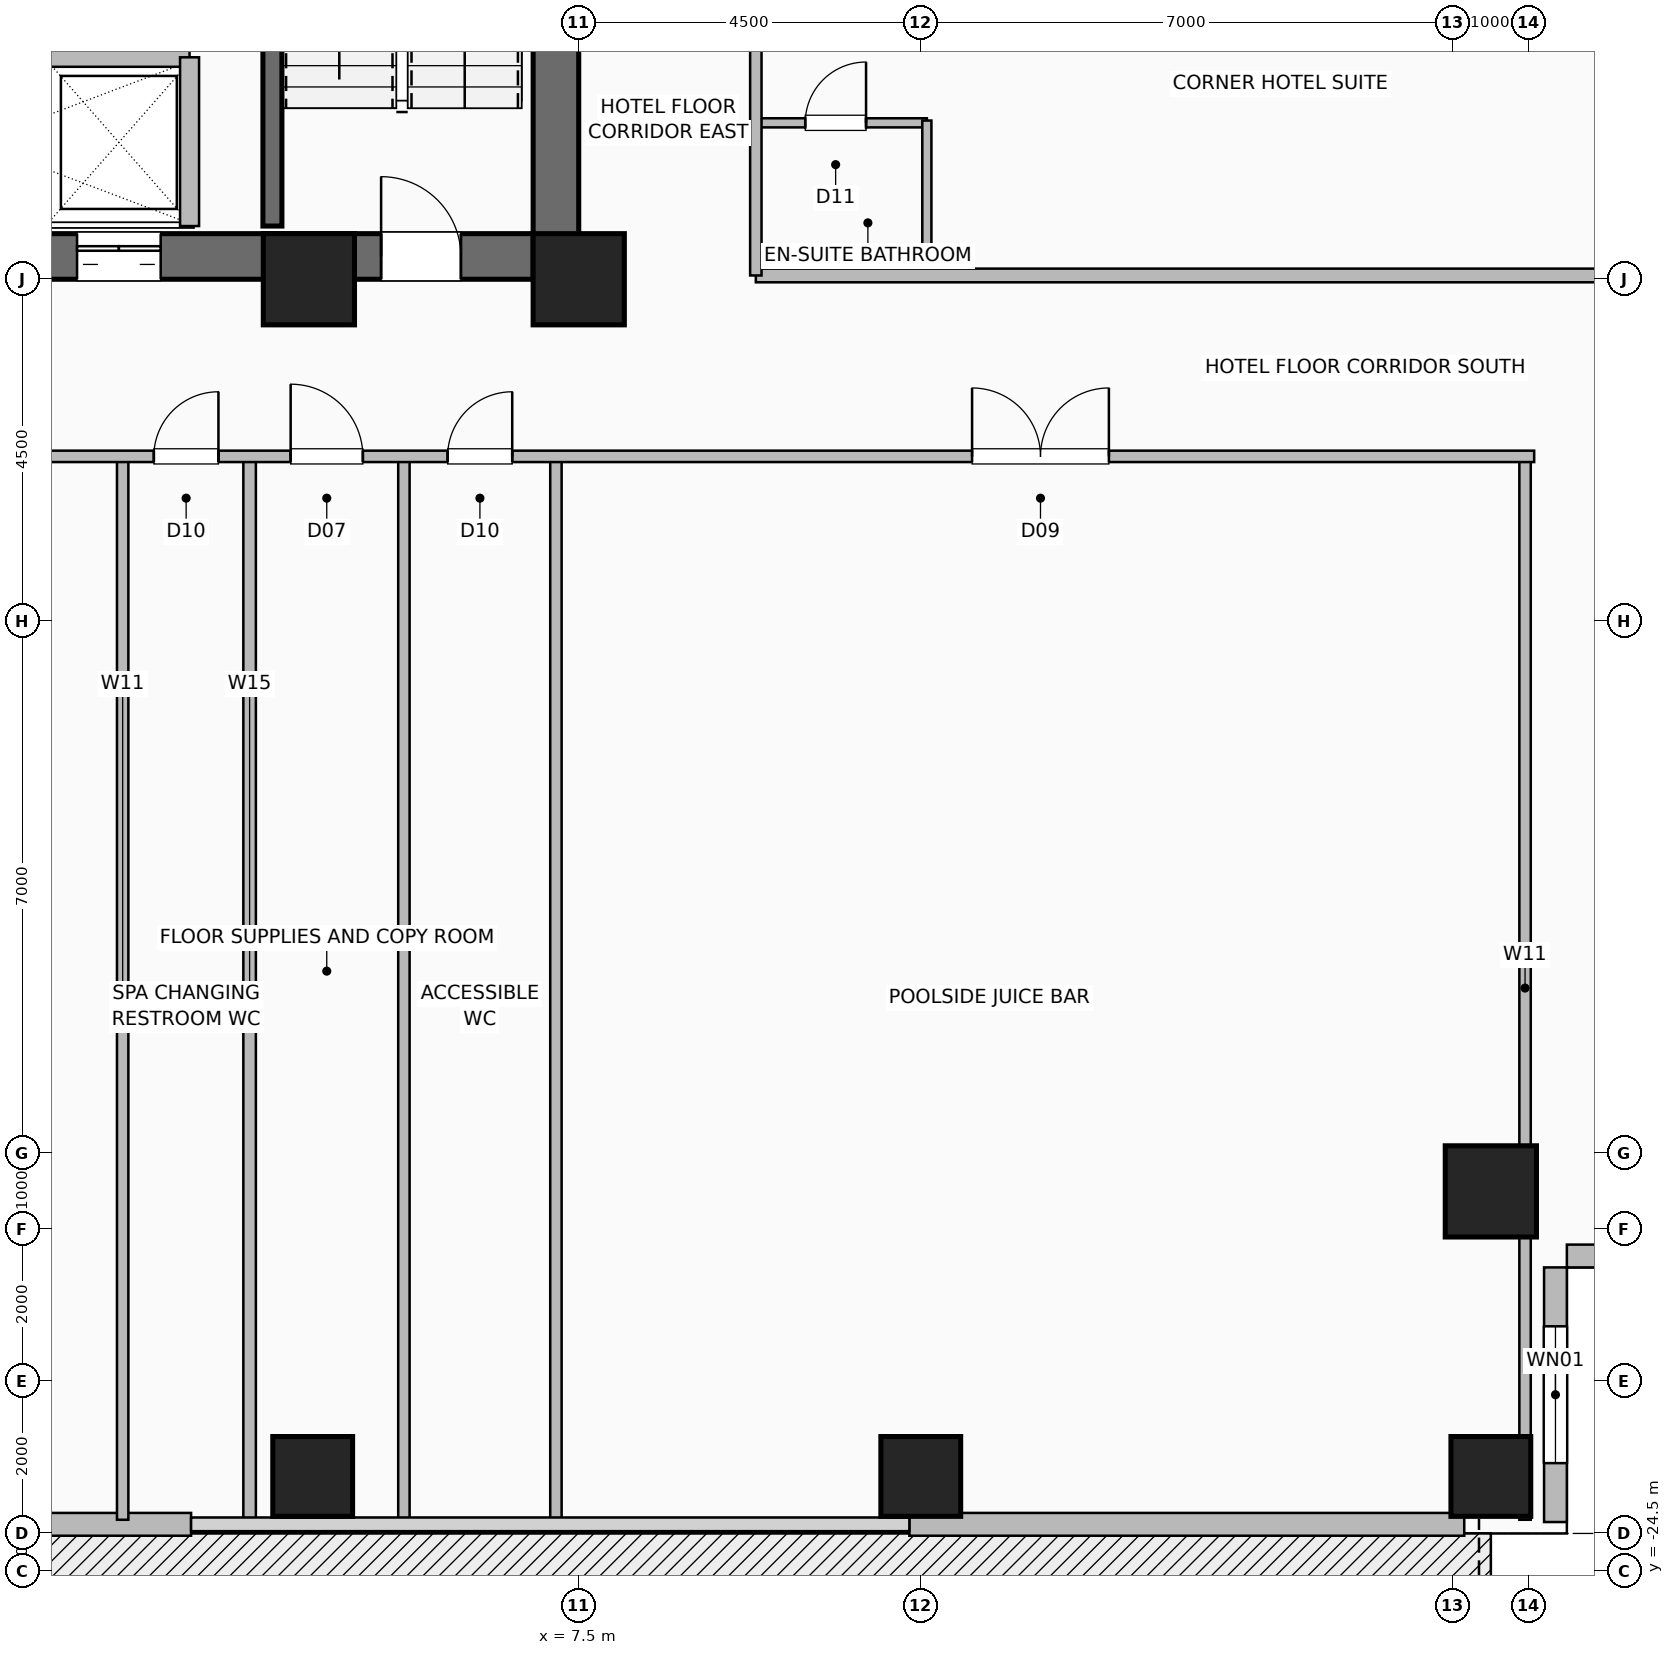
"""IFC4 building model, lengths in metres.
Left out: names, types, materials, properties, quantities, classifications, styles, units other than length and angle.
Written with IfcOpenShell. Run it as: python <this file> out.ifc"""

import sys

from ifc_helpers import new_model, si_unit, direction, frame, frame_2d, origin, origin_2d, place, context, subcontext, project, spatial, rectangle, hollow_rectangle, extrude, element, fill, save


model = new_model("IFC4")
c1 = context("Model", 3, precision=1e-05, world=origin(), true_north=direction((0.0, 1.0)))
c2 = subcontext(c1, "Body", "Model", "MODEL_VIEW")
j1 = project(units=[si_unit("LENGTHUNIT", "METRE"), si_unit("PLANEANGLEUNIT", "RADIAN")], contexts=[c1])
p1 = place(None, origin())
s1 = spatial("IfcSite", under=j1, at=p1, CompositionType="ELEMENT")
p2 = place(p1, origin())
s2 = spatial("IfcBuilding", under=s1, at=p2, CompositionType="ELEMENT")
p3 = place(p2, frame((0.0, 0.0, 55.0)))
s3 = spatial("IfcBuildingStorey", under=s2, at=p3, CompositionType="ELEMENT", Elevation=55.0)
for number, where, z_axis, x_axis in (
    (1, (3.95, -7.5, 0.0), (0.0, 0.0, 1.0), (1.0, 0.0, 0.0)),
    (2, (7.5, -7.5, 0.0), (0.0, 0.0, 1.0), (1.0, 0.0, 0.0)),
):
    element("IfcColumn", number, at=place(p3, frame(where, z_axis=z_axis, x_axis=x_axis)), inside=s3, PredefinedType="COLUMN", context=c2, shape_type="SweptSolid", body=[
        extrude(hollow_rectangle(XDim=1.2, YDim=1.2, WallThickness=0.055, at=origin_2d()), origin(), (0.0, 0.0, 1.0), 3.5),
    ])
for number, where, z_axis, x_axis in (
    (3, (4.0, -23.25, 0.0), (0.0, 0.0, 1.0), (1.0, 0.0, 0.0)),
    (4, (12.0, -23.25, 0.0), (0.0, 0.0, 1.0), (1.0, 0.0, 0.0)),
    (5, (19.5, -23.25, 0.0), (0.0, 0.0, 1.0), (1.0, 0.0, 0.0)),
):
    element("IfcColumn", number, at=place(p3, frame(where, z_axis=z_axis, x_axis=x_axis)), inside=s3, PredefinedType="COLUMN", context=c2, shape_type="SweptSolid", body=[
        extrude(hollow_rectangle(XDim=1.05, YDim=1.05, WallThickness=0.05, at=origin_2d()), origin(), (0.0, 0.0, 1.0), 3.5),
    ])
p4 = place(p3, frame((19.5, -19.5, 0.0), z_axis=(0.0, 0.0, 1.0), x_axis=(1.0, 0.0, 0.0)))
e6 = element("IfcColumn", 6, at=p4, inside=s3, PredefinedType="COLUMN", context=c2, shape_type="SweptSolid", body=[
    extrude(hollow_rectangle(XDim=1.2, YDim=1.2, WallThickness=0.055, at=origin_2d()), origin(), (0.0, 0.0, 1.0), 3.5),
])
p5 = place(p3, frame((11.85, -23.88, 0.0), z_axis=(0.0, 0.0, 1.0), x_axis=(1.0, 0.0, 0.0)))
e7 = element("IfcWall", 7, at=p5, inside=s3, PredefinedType="SOLIDWALL", context=c2, shape_type="SweptSolid", body=[
    extrude(rectangle(XDim=7.3, YDim=0.3, at=frame_2d((3.65, 0.0))), origin(), (0.0, 0.0, 1.0), 3.25),
])
p6 = place(p3, frame((-2.4, -23.88, 0.0), z_axis=(0.0, 0.0, 1.0), x_axis=(1.0, 0.0, 0.0)))
e8 = element("IfcWall", 8, at=p6, inside=s3, PredefinedType="SOLIDWALL", context=c2, shape_type="SweptSolid", body=[
    extrude(rectangle(XDim=4.8, YDim=0.3, at=frame_2d((2.4, 0.0))), origin(), (0.0, 0.0, 1.0), 3.25),
])
p7 = place(p6, frame((1.85, 0.0, 0.0)))
e9 = element("IfcOpeningElement", 9, at=p7, cuts=e8, PredefinedType="OPENING", context=c2, shape_type="SweptSolid", body=[
    extrude(rectangle(XDim=1.1, YDim=2.2, at=frame_2d((0.55, 1.1))), frame((0.0, 0.16, 0.0), z_axis=(0.0, -1.0, 0.0), x_axis=(1.0, 0.0, 0.0)), (0.0, 0.0, 1.0), 0.32),
])
p8 = place(p6, frame((0.15, 0.0, 0.85)))
e10 = element("IfcOpeningElement", 10, at=p8, cuts=e8, PredefinedType="OPENING", context=c2, shape_type="SweptSolid", body=[
    extrude(rectangle(XDim=1.5, YDim=1.8, at=frame_2d((0.75, 0.9))), frame((0.0, 0.16, 0.0), z_axis=(0.0, -1.0, 0.0), x_axis=(1.0, 0.0, 0.0)), (0.0, 0.0, 1.0), 0.32),
])
p9 = place(p3, frame((20.35, -23.85, 0.0), z_axis=(0.0, 0.0, 1.0), x_axis=(0.0, 1.0, 0.0)))
e11 = element("IfcWall", 11, at=p9, inside=s3, PredefinedType="SOLIDWALL", context=c2, shape_type="SweptSolid", body=[
    extrude(rectangle(XDim=3.35, YDim=0.3, at=frame_2d((1.675, 0.0))), origin(), (0.0, 0.0, 1.0), 3.25),
])
p10 = place(p9, frame((0.775, 0.0, 0.9)))
e12 = element("IfcOpeningElement", 12, at=p10, cuts=e11, PredefinedType="OPENING", context=c2, shape_type="SweptSolid", body=[
    extrude(rectangle(XDim=1.8, YDim=1.8, at=frame_2d((0.9, 0.9))), frame((0.0, 0.16, 0.0), z_axis=(0.0, -1.0, 0.0), x_axis=(1.0, 0.0, 0.0)), (0.0, 0.0, 1.0), 0.32),
])
p11 = place(p3, frame((23.85, -20.35, 0.0), z_axis=(0.0, 0.0, 1.0), x_axis=(-1.0, 0.0, 0.0)))
e13 = element("IfcWall", 13, at=p11, inside=s3, PredefinedType="SOLIDWALL", context=c2, shape_type="SweptSolid", body=[
    extrude(rectangle(XDim=3.35, YDim=0.3, at=frame_2d((1.675, 0.0))), origin(), (0.0, 0.0, 1.0), 3.25),
])
p12 = place(p3, frame((-7.5, -7.2, 0.0), z_axis=(0.0, 0.0, 1.0), x_axis=(1.0, 0.0, 0.0)))
e14 = element("IfcWall", 14, at=p12, inside=s3, PredefinedType="SHEAR", context=c2, shape_type="SweptSolid", body=[
    extrude(rectangle(XDim=15.0, YDim=0.6, at=frame_2d((7.5, 0.0))), origin(), (0.0, 0.0, 1.0), 3.25),
])
p13 = place(p12, frame((1.55, 0.0, 0.0)))
e15 = element("IfcOpeningElement", 15, at=p13, cuts=e14, PredefinedType="OPENING", context=c2, shape_type="SweptSolid", body=[
    extrude(rectangle(XDim=1.05, YDim=2.08, at=frame_2d((0.525, 1.04))), frame((0.0, 0.31, 0.0), z_axis=(0.0, -1.0, 0.0), x_axis=(1.0, 0.0, 0.0)), (0.0, 0.0, 1.0), 0.62),
])
p14 = place(p12, frame((12.4, 0.0, 0.0)))
e16 = element("IfcOpeningElement", 16, at=p14, cuts=e14, PredefinedType="OPENING", context=c2, shape_type="SweptSolid", body=[
    extrude(rectangle(XDim=1.05, YDim=2.08, at=frame_2d((0.525, 1.04))), frame((0.0, 0.31, 0.0), z_axis=(0.0, -1.0, 0.0), x_axis=(1.0, 0.0, 0.0)), (0.0, 0.0, 1.0), 0.62),
])
p15 = place(p12, frame((4.64, 0.0, 0.0)))
e17 = element("IfcOpeningElement", 17, at=p15, cuts=e14, PredefinedType="OPENING", context=c2, shape_type="SweptSolid", body=[
    extrude(rectangle(XDim=1.1, YDim=2.2, at=frame_2d((0.55, 1.1))), frame((0.0, 0.31, 0.0), z_axis=(0.0, -1.0, 0.0), x_axis=(1.0, 0.0, 0.0)), (0.0, 0.0, 1.0), 0.62),
])
p16 = place(p12, frame((6.52, 0.0, 0.0)))
e18 = element("IfcOpeningElement", 18, at=p16, cuts=e14, PredefinedType="OPENING", context=c2, shape_type="SweptSolid", body=[
    extrude(rectangle(XDim=1.1, YDim=2.2, at=frame_2d((0.55, 1.1))), frame((0.0, 0.31, 0.0), z_axis=(0.0, -1.0, 0.0), x_axis=(1.0, 0.0, 0.0)), (0.0, 0.0, 1.0), 0.62),
])
p17 = place(p12, frame((8.4, 0.0, 0.0)))
e19 = element("IfcOpeningElement", 19, at=p17, cuts=e14, PredefinedType="OPENING", context=c2, shape_type="SweptSolid", body=[
    extrude(rectangle(XDim=1.1, YDim=2.2, at=frame_2d((0.55, 1.1))), frame((0.0, 0.31, 0.0), z_axis=(0.0, -1.0, 0.0), x_axis=(1.0, 0.0, 0.0)), (0.0, 0.0, 1.0), 0.62),
])
p18 = place(p3, frame((7.2, -7.5, 0.0), z_axis=(0.0, 0.0, 1.0), x_axis=(0.0, 1.0, 0.0)))
e20 = element("IfcWall", 20, at=p18, inside=s3, PredefinedType="SHEAR", context=c2, shape_type="SweptSolid", body=[
    extrude(rectangle(XDim=15.0, YDim=0.6, at=frame_2d((7.5, 0.0))), origin(), (0.0, 0.0, 1.0), 3.25),
])
p19 = place(p3, frame((3.47, -6.8, 0.0), z_axis=(0.0, 0.0, 1.0), x_axis=(0.0, 1.0, 0.0)))
e21 = element("IfcWall", 21, at=p19, inside=s3, PredefinedType="SHEAR", context=c2, shape_type="SweptSolid", body=[
    extrude(rectangle(XDim=7.72, YDim=0.25, at=frame_2d((3.86, 0.0))), origin(), (0.0, 0.0, 1.0), 3.25),
])
p20 = place(p3, frame((-3.26, -4.58, 0.0), z_axis=(0.0, 0.0, 1.0), x_axis=(1.0, 0.0, 0.0)))
e22 = element("IfcWall", 22, at=p20, inside=s3, PredefinedType="SHEAR", context=c2, shape_type="SweptSolid", body=[
    extrude(rectangle(XDim=5.64, YDim=0.25, at=frame_2d((2.82, 0.0))), origin(), (0.0, 0.0, 1.0), 3.25),
])
p21 = place(p3, frame((2.38, -6.8, 0.0), z_axis=(0.0, 0.0, 1.0), x_axis=(0.0, 1.0, 0.0)))
e23 = element("IfcWall", 23, at=p21, inside=s3, PredefinedType="SHEAR", context=c2, shape_type="SweptSolid", body=[
    extrude(rectangle(XDim=2.22, YDim=0.25, at=frame_2d((1.11, 0.0))), origin(), (0.0, 0.0, 1.0), 3.25),
])
p22 = place(p3, frame((3.17, -23.82, 0.0), z_axis=(0.0, 0.0, 1.0), x_axis=(0.0, 1.0, 0.0)))
e24 = element("IfcWall", 24, at=p22, inside=s3, PredefinedType="PLUMBINGWALL", context=c2, shape_type="SweptSolid", body=[
    extrude(rectangle(XDim=13.99, YDim=0.165, at=frame_2d((6.995, 0.0))), origin(), (0.0, 0.0, 1.0), 3.25),
])
for number, where, z_axis, x_axis in (
    (25, (1.5, -23.82, 0.0), (0.0, 0.0, 1.0), (0.0, 1.0, 0.0)),
    (26, (5.2, -23.82, 0.0), (0.0, 0.0, 1.0), (0.0, 1.0, 0.0)),
    (27, (7.2, -23.82, 0.0), (0.0, 0.0, 1.0), (0.0, 1.0, 0.0)),
    (28, (19.95, -23.82, 0.0), (0.0, 0.0, 1.0), (0.0, 1.0, 0.0)),
):
    element("IfcWall", number, at=place(p3, frame(where, z_axis=z_axis, x_axis=x_axis)), inside=s3, PredefinedType="PARTITIONING", context=c2, shape_type="SweptSolid", body=[
        extrude(rectangle(XDim=13.99, YDim=0.15, at=frame_2d((6.995, 0.0))), origin(), (0.0, 0.0, 1.0), 3.25),
    ])
p23 = place(p3, frame((-20.07, -9.83, 0.0), z_axis=(0.0, 0.0, 1.0), x_axis=(1.0, 0.0, 0.0)))
e29 = element("IfcWall", 29, at=p23, inside=s3, PredefinedType="PARTITIONING", context=c2, shape_type="SweptSolid", body=[
    extrude(rectangle(XDim=40.14, YDim=0.15, at=frame_2d((20.07, 0.0))), origin(), (0.0, 0.0, 1.0), 3.25),
])
p24 = place(p23, frame((4.445, 0.0, 0.0)))
e30 = element("IfcOpeningElement", 30, at=p24, cuts=e29, PredefinedType="OPENING", context=c2, shape_type="SweptSolid", body=[
    extrude(rectangle(XDim=1.8, YDim=2.08, at=frame_2d((0.9, 1.04))), frame((0.0, 0.085, 0.0), z_axis=(0.0, -1.0, 0.0), x_axis=(1.0, 0.0, 0.0)), (0.0, 0.0, 1.0), 0.17),
])
p25 = place(p23, frame((15.17, 0.0, 0.0)))
e31 = element("IfcOpeningElement", 31, at=p25, cuts=e29, PredefinedType="OPENING", context=c2, shape_type="SweptSolid", body=[
    extrude(rectangle(XDim=1.8, YDim=2.08, at=frame_2d((0.9, 1.04))), frame((0.0, 0.085, 0.0), z_axis=(0.0, -1.0, 0.0), x_axis=(1.0, 0.0, 0.0)), (0.0, 0.0, 1.0), 0.17),
])
p26 = place(p23, frame((21.98, 0.0, 0.0)))
e32 = element("IfcOpeningElement", 32, at=p26, cuts=e29, PredefinedType="OPENING", context=c2, shape_type="SweptSolid", body=[
    extrude(rectangle(XDim=0.85, YDim=2.05, at=frame_2d((0.425, 1.025))), frame((0.0, 0.085, 0.0), z_axis=(0.0, -1.0, 0.0), x_axis=(1.0, 0.0, 0.0)), (0.0, 0.0, 1.0), 0.17),
])
p27 = place(p23, frame((23.78, 0.0, 0.0)))
e33 = element("IfcOpeningElement", 33, at=p27, cuts=e29, PredefinedType="OPENING", context=c2, shape_type="SweptSolid", body=[
    extrude(rectangle(XDim=0.95, YDim=2.06, at=frame_2d((0.475, 1.03))), frame((0.0, 0.085, 0.0), z_axis=(0.0, -1.0, 0.0), x_axis=(1.0, 0.0, 0.0)), (0.0, 0.0, 1.0), 0.17),
])
p28 = place(p23, frame((25.845, 0.0, 0.0)))
e34 = element("IfcOpeningElement", 34, at=p28, cuts=e29, PredefinedType="OPENING", context=c2, shape_type="SweptSolid", body=[
    extrude(rectangle(XDim=0.85, YDim=2.05, at=frame_2d((0.425, 1.025))), frame((0.0, 0.085, 0.0), z_axis=(0.0, -1.0, 0.0), x_axis=(1.0, 0.0, 0.0)), (0.0, 0.0, 1.0), 0.17),
])
p29 = place(p23, frame((32.745, 0.0, 0.0)))
e35 = element("IfcOpeningElement", 35, at=p29, cuts=e29, PredefinedType="OPENING", context=c2, shape_type="SweptSolid", body=[
    extrude(rectangle(XDim=1.8, YDim=2.08, at=frame_2d((0.9, 1.04))), frame((0.0, 0.085, 0.0), z_axis=(0.0, -1.0, 0.0), x_axis=(1.0, 0.0, 0.0)), (0.0, 0.0, 1.0), 0.17),
])
p30 = place(p3, frame((9.83, -5.442, 0.0), z_axis=(0.0, 0.0, 1.0), x_axis=(1.0, 0.0, 0.0)))
e36 = element("IfcWall", 36, at=p30, inside=s3, PredefinedType="PLUMBINGWALL", context=c2, shape_type="SweptSolid", body=[
    extrude(rectangle(XDim=2.25, YDim=0.12, at=frame_2d((1.125, 0.0))), origin(), (0.0, 0.0, 1.0), 3.25),
])
p31 = place(p30, frame((0.65, 0.0, 0.0)))
e37 = element("IfcOpeningElement", 37, at=p31, cuts=e36, PredefinedType="OPENING", context=c2, shape_type="SweptSolid", body=[
    extrude(rectangle(XDim=0.8, YDim=2.05, at=frame_2d((0.4, 1.025))), frame((0.0, 0.07, 0.0), z_axis=(0.0, -1.0, 0.0), x_axis=(1.0, 0.0, 0.0)), (0.0, 0.0, 1.0), 0.14),
])
p32 = place(p3, frame((12.08, -7.42, 0.0), z_axis=(0.0, 0.0, 1.0), x_axis=(0.0, 1.0, 0.0)))
e38 = element("IfcWall", 38, at=p32, inside=s3, PredefinedType="PLUMBINGWALL", context=c2, shape_type="SweptSolid", body=[
    extrude(rectangle(XDim=2.008, YDim=0.12, at=frame_2d((1.004, 0.0))), origin(), (0.0, 0.0, 1.0), 3.25),
])
p33 = place(p3, frame((9.83, -7.45, 0.0), z_axis=(0.0, 0.0, 1.0), x_axis=(1.0, 0.0, 0.0)))
e39 = element("IfcWall", 39, at=p33, inside=s3, PredefinedType="PARTITIONING", context=c2, shape_type="SweptSolid", body=[
    extrude(rectangle(XDim=13.99, YDim=0.18, at=frame_2d((6.995, 0.0))), origin(), (0.0, 0.0, 1.0), 3.25),
])
p34 = place(p3, frame((9.83, -7.45, 0.0), z_axis=(0.0, 0.0, 1.0), x_axis=(0.0, 1.0, 0.0)))
e40 = element("IfcWall", 40, at=p34, inside=s3, PredefinedType="PARTITIONING", context=c2, shape_type="SweptSolid", body=[
    extrude(rectangle(XDim=14.9, YDim=0.15, at=frame_2d((7.45, 0.0))), origin(), (0.0, 0.0, 1.0), 3.25),
])
p35 = place(p34, frame((3.049, 0.0, 0.0)))
e41 = element("IfcOpeningElement", 41, at=p35, cuts=e40, PredefinedType="OPENING", context=c2, shape_type="SweptSolid", body=[
    extrude(rectangle(XDim=0.95, YDim=2.08, at=frame_2d((0.475, 1.04))), frame((0.0, 0.085, 0.0), z_axis=(0.0, -1.0, 0.0), x_axis=(1.0, 0.0, 0.0)), (0.0, 0.0, 1.0), 0.17),
])
p36 = place(p34, frame((7.927, 0.0, 0.0)))
e42 = element("IfcOpeningElement", 42, at=p36, cuts=e40, PredefinedType="OPENING", context=c2, shape_type="SweptSolid", body=[
    extrude(rectangle(XDim=0.95, YDim=2.08, at=frame_2d((0.475, 1.04))), frame((0.0, 0.085, 0.0), z_axis=(0.0, -1.0, 0.0), x_axis=(1.0, 0.0, 0.0)), (0.0, 0.0, 1.0), 0.17),
])
p37 = place(p34, frame((12.899, 0.0, 0.0)))
e43 = element("IfcOpeningElement", 43, at=p37, cuts=e40, PredefinedType="OPENING", context=c2, shape_type="SweptSolid", body=[
    extrude(rectangle(XDim=0.95, YDim=2.08, at=frame_2d((0.475, 1.04))), frame((0.0, 0.085, 0.0), z_axis=(0.0, -1.0, 0.0), x_axis=(1.0, 0.0, 0.0)), (0.0, 0.0, 1.0), 0.17),
])
p38 = place(p10, origin())
e44 = element("IfcWindow", 44, at=p38, inside=s3, PartitioningType="SINGLE_PANEL", PredefinedType="WINDOW", context=c2, shape_type="SweptSolid", body=[
    extrude(rectangle(XDim=1.8, YDim=1.8, at=frame_2d((0.9, 0.9))), frame((0.0, 0.03, 0.0), z_axis=(0.0, -1.0, 0.0), x_axis=(1.0, 0.0, 0.0)), (0.0, 0.0, 1.0), 0.06),
])
fill(e12, e44)
p39 = place(p14, origin())
e45 = element("IfcDoor", 45, at=p39, inside=s3, OperationType="SINGLE_SWING_LEFT", PredefinedType="DOOR", context=c2, shape_type="SweptSolid", body=[
    extrude(rectangle(XDim=1.05, YDim=2.08, at=frame_2d((0.525, 1.04))), frame((0.0, 0.025, 0.0), z_axis=(0.0, -1.0, 0.0), x_axis=(1.0, 0.0, 0.0)), (0.0, 0.0, 1.0), 0.05),
])
fill(e16, e45)
p40 = place(p17, origin())
e46 = element("IfcDoor", 46, at=p40, inside=s3, OperationType="DOUBLE_DOOR_SLIDING", PredefinedType="DOOR", context=c2, shape_type="SweptSolid", body=[
    extrude(rectangle(XDim=1.1, YDim=2.2, at=frame_2d((0.55, 1.1))), frame((0.0, 0.025, 0.0), z_axis=(0.0, -1.0, 0.0), x_axis=(1.0, 0.0, 0.0)), (0.0, 0.0, 1.0), 0.05),
])
fill(e19, e46)
p41 = place(p26, origin())
e47 = element("IfcDoor", 47, at=p41, inside=s3, OperationType="SINGLE_SWING_RIGHT", PredefinedType="DOOR", context=c2, shape_type="SweptSolid", body=[
    extrude(rectangle(XDim=0.85, YDim=2.05, at=frame_2d((0.425, 1.025))), frame((0.0, 0.025, 0.0), z_axis=(0.0, -1.0, 0.0), x_axis=(1.0, 0.0, 0.0)), (0.0, 0.0, 1.0), 0.05),
])
fill(e32, e47)
p42 = place(p27, origin())
e48 = element("IfcDoor", 48, at=p42, inside=s3, OperationType="SINGLE_SWING_LEFT", PredefinedType="DOOR", context=c2, shape_type="SweptSolid", body=[
    extrude(rectangle(XDim=0.95, YDim=2.06, at=frame_2d((0.475, 1.03))), frame((0.0, 0.025, 0.0), z_axis=(0.0, -1.0, 0.0), x_axis=(1.0, 0.0, 0.0)), (0.0, 0.0, 1.0), 0.05),
])
fill(e33, e48)
p43 = place(p28, origin())
e49 = element("IfcDoor", 49, at=p43, inside=s3, OperationType="SINGLE_SWING_RIGHT", PredefinedType="DOOR", context=c2, shape_type="SweptSolid", body=[
    extrude(rectangle(XDim=0.85, YDim=2.05, at=frame_2d((0.425, 1.025))), frame((0.0, 0.025, 0.0), z_axis=(0.0, -1.0, 0.0), x_axis=(1.0, 0.0, 0.0)), (0.0, 0.0, 1.0), 0.05),
])
fill(e34, e49)
p44 = place(p29, origin())
e50 = element("IfcDoor", 50, at=p44, inside=s3, OperationType="DOUBLE_DOOR_SINGLE_SWING", PredefinedType="DOOR", context=c2, shape_type="SweptSolid", body=[
    extrude(rectangle(XDim=1.8, YDim=2.08, at=frame_2d((0.9, 1.04))), frame((0.0, 0.025, 0.0), z_axis=(0.0, -1.0, 0.0), x_axis=(1.0, 0.0, 0.0)), (0.0, 0.0, 1.0), 0.05),
])
fill(e35, e50)
p45 = place(p31, origin())
e51 = element("IfcDoor", 51, at=p45, inside=s3, OperationType="SINGLE_SWING_RIGHT", PredefinedType="DOOR", context=c2, shape_type="SweptSolid", body=[
    extrude(rectangle(XDim=0.8, YDim=2.05, at=frame_2d((0.4, 1.025))), frame((0.0, 0.025, 0.0), z_axis=(0.0, -1.0, 0.0), x_axis=(1.0, 0.0, 0.0)), (0.0, 0.0, 1.0), 0.05),
])
fill(e37, e51)
save(model, sys.argv[1])
